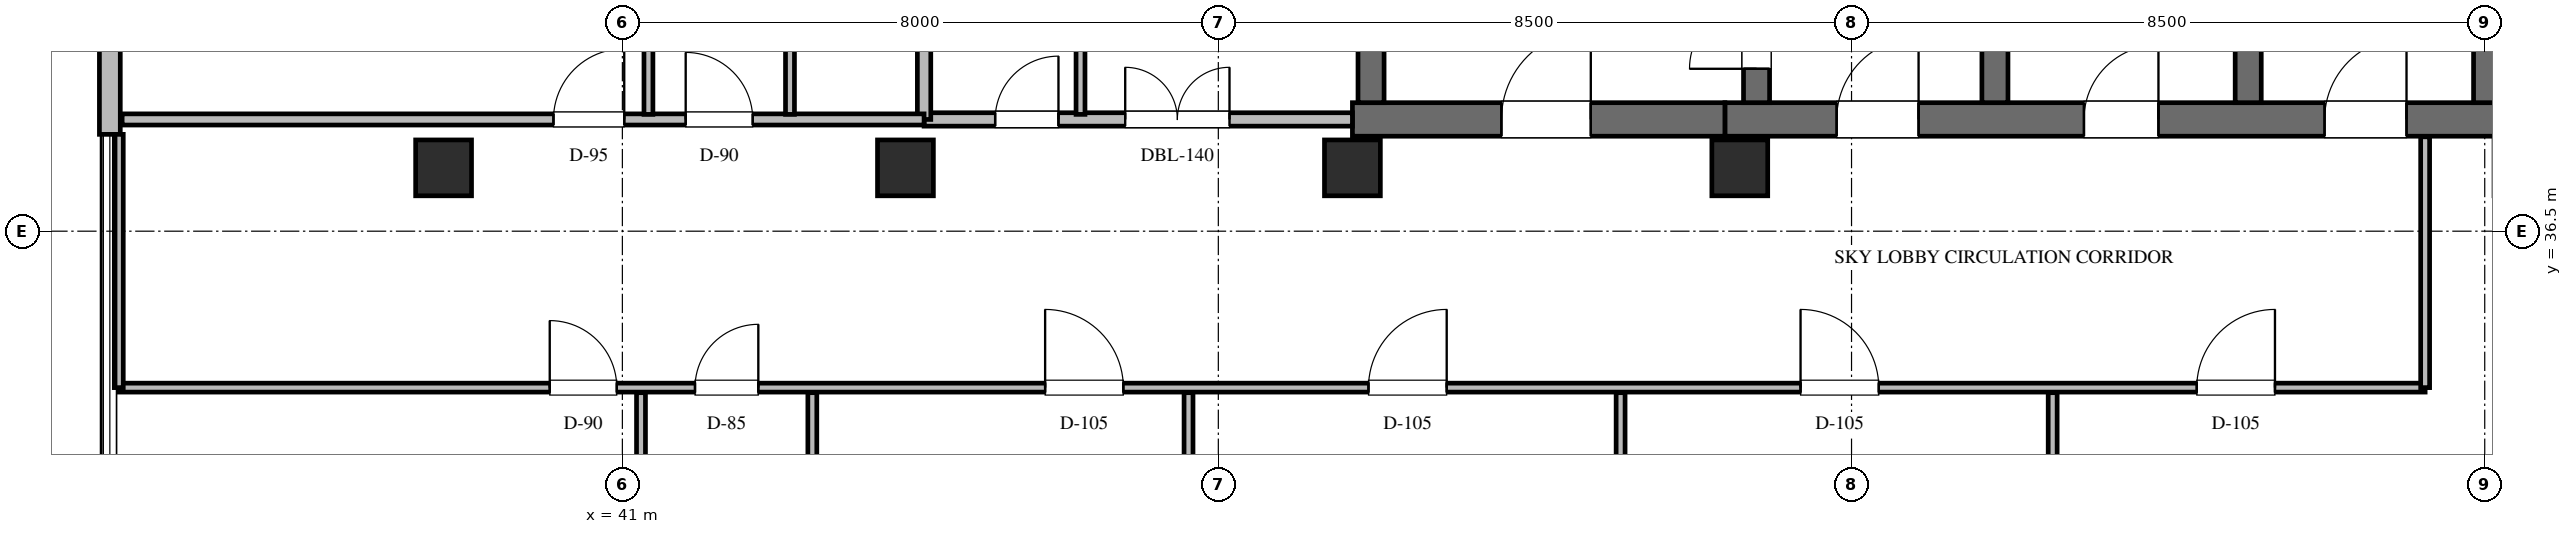
"""IFC4 building model, lengths in metres.
Left out: names, types, materials, properties, quantities, classifications, styles, units other than length and angle.
Written with IfcOpenShell. Run it as: python <this file> out.ifc"""

import sys

from ifc_helpers import new_model, si_unit, direction, frame, frame_2d, origin, origin_2d, place, context, subcontext, project, spatial, rectangle, extrude, element, fill, save


model = new_model("IFC4")
c1 = context("Model", 3, precision=1e-05, world=origin(), true_north=direction((0.0, 1.0)))
c2 = subcontext(c1, "Body", "Model", "MODEL_VIEW")
j1 = project(units=[si_unit("LENGTHUNIT", "METRE"), si_unit("PLANEANGLEUNIT", "RADIAN")], contexts=[c1])
p1 = place(None, origin())
s1 = spatial("IfcSite", under=j1, at=p1, CompositionType="ELEMENT")
p2 = place(p1, origin())
s2 = spatial("IfcBuilding", under=s1, at=p2, CompositionType="ELEMENT")
p3 = place(p2, frame((0.0, 0.0, 311.1)))
s3 = spatial("IfcBuildingStorey", under=s2, at=p3, CompositionType="ELEMENT", Elevation=311.1)
p4 = place(p3, frame((55.8, 38.0, 0.0), z_axis=(0.0, 0.0, 1.0), x_axis=(1.0, 0.0, 0.0)))
e1 = element("IfcWall", 1, at=p4, inside=s3, PredefinedType="SHEAR", context=c2, shape_type="SweptSolid", body=[
    extrude(rectangle(XDim=10.5, YDim=0.45, at=frame_2d((5.25, 0.0))), origin(), (0.0, 0.0, 1.0), 4.5),
])
p5 = place(p4, frame((1.5, 0.0, 0.0)))
e2 = element("IfcOpeningElement", 2, at=p5, cuts=e1, PredefinedType="OPENING", context=c2, shape_type="SweptSolid", body=[
    extrude(rectangle(XDim=1.1, YDim=2.2, at=frame_2d((0.55, 1.1))), frame((0.0, 0.235, 0.0), z_axis=(0.0, -1.0, 0.0), x_axis=(1.0, 0.0, 0.0)), (0.0, 0.0, 1.0), 0.47),
])
p6 = place(p4, frame((4.82, 0.0, 0.0)))
e3 = element("IfcOpeningElement", 3, at=p6, cuts=e1, PredefinedType="OPENING", context=c2, shape_type="SweptSolid", body=[
    extrude(rectangle(XDim=1.0, YDim=2.15, at=frame_2d((0.5, 1.075))), frame((0.0, 0.235, 0.0), z_axis=(0.0, -1.0, 0.0), x_axis=(1.0, 0.0, 0.0)), (0.0, 0.0, 1.0), 0.47),
])
p7 = place(p4, frame((8.05, 0.0, 0.0)))
e4 = element("IfcOpeningElement", 4, at=p7, cuts=e1, PredefinedType="OPENING", context=c2, shape_type="SweptSolid", body=[
    extrude(rectangle(XDim=1.1, YDim=2.2, at=frame_2d((0.55, 1.1))), frame((0.0, 0.235, 0.0), z_axis=(0.0, -1.0, 0.0), x_axis=(1.0, 0.0, 0.0)), (0.0, 0.0, 1.0), 0.47),
])
p8 = place(p3, frame((66.075, 38.225, 0.0), z_axis=(0.0, 0.0, 1.0), x_axis=(0.0, 1.0, 0.0)))
e5 = element("IfcWall", 5, at=p8, inside=s3, PredefinedType="SHEAR", context=c2, shape_type="SweptSolid", body=[
    extrude(rectangle(XDim=8.525, YDim=0.45, at=frame_2d((4.262, 0.0))), origin(), (0.0, 0.0, 1.0), 4.5),
])
for number, where, z_axis, x_axis in (
    (6, (62.825, 38.225, 0.0), (0.0, 0.0, 1.0), (0.0, 1.0, 0.0)),
    (7, (59.425, 38.225, 0.0), (0.0, 0.0, 1.0), (0.0, 1.0, 0.0)),
):
    element("IfcWall", number, at=place(p3, frame(where, z_axis=z_axis, x_axis=x_axis)), inside=s3, PredefinedType="SHEAR", context=c2, shape_type="SweptSolid", body=[
        extrude(rectangle(XDim=8.525, YDim=0.35, at=frame_2d((4.262, 0.0))), origin(), (0.0, 0.0, 1.0), 4.5),
    ])
p9 = place(p3, frame((56.225, 38.225, 0.0), z_axis=(0.0, 0.0, 1.0), x_axis=(0.0, 1.0, 0.0)))
e8 = element("IfcWall", 8, at=p9, inside=s3, PredefinedType="SHEAR", context=c2, shape_type="SweptSolid", body=[
    extrude(rectangle(XDim=8.525, YDim=0.35, at=frame_2d((4.262, 0.0))), origin(), (0.0, 0.0, 1.0), 4.5),
])
p10 = place(p9, frame((0.455, 0.0, 0.0)))
e9 = element("IfcOpeningElement", 9, at=p10, cuts=e8, PredefinedType="OPENING", context=c2, shape_type="SweptSolid", body=[
    extrude(rectangle(XDim=0.9, YDim=2.15, at=frame_2d((0.45, 1.075))), frame((0.0, 0.185, 0.0), z_axis=(0.0, -1.0, 0.0), x_axis=(1.0, 0.0, 0.0)), (0.0, 0.0, 1.0), 0.37),
])
p11 = place(p3, frame((50.8, 38.0, 0.0), z_axis=(0.0, 0.0, 1.0), x_axis=(1.0, 0.0, 0.0)))
e10 = element("IfcWall", 10, at=p11, inside=s3, PredefinedType="SHEAR", context=c2, shape_type="SweptSolid", body=[
    extrude(rectangle(XDim=5.0, YDim=0.45, at=frame_2d((2.5, 0.0))), origin(), (0.0, 0.0, 1.0), 4.5),
])
p12 = place(p11, frame((2.0, 0.0, 0.0)))
e11 = element("IfcOpeningElement", 11, at=p12, cuts=e10, PredefinedType="OPENING", context=c2, shape_type="SweptSolid", body=[
    extrude(rectangle(XDim=1.2, YDim=2.2, at=frame_2d((0.6, 1.1))), frame((0.0, 0.235, 0.0), z_axis=(0.0, -1.0, 0.0), x_axis=(1.0, 0.0, 0.0)), (0.0, 0.0, 1.0), 0.47),
])
p13 = place(p3, frame((51.05, 38.225, 0.0), z_axis=(0.0, 0.0, 1.0), x_axis=(0.0, 1.0, 0.0)))
e12 = element("IfcWall", 12, at=p13, inside=s3, PredefinedType="SHEAR", context=c2, shape_type="SweptSolid", body=[
    extrude(rectangle(XDim=8.525, YDim=0.35, at=frame_2d((4.262, 0.0))), origin(), (0.0, 0.0, 1.0), 4.5),
])
for number, where, z_axis, x_axis in (
    (13, (56.0, 37.35, 0.0), (0.0, 0.0, 1.0), (1.0, 0.0, 0.0)),
    (14, (50.8, 37.35, 0.0), (0.0, 0.0, 1.0), (1.0, 0.0, 0.0)),
    (15, (44.8, 37.35, 0.0), (0.0, 0.0, 1.0), (1.0, 0.0, 0.0)),
    (16, (38.6, 37.35, 0.0), (0.0, 0.0, 1.0), (1.0, 0.0, 0.0)),
):
    element("IfcColumn", number, at=place(p3, frame(where, z_axis=z_axis, x_axis=x_axis)), inside=s3, PredefinedType="COLUMN", context=c2, shape_type="SweptSolid", body=[
        extrude(rectangle(XDim=0.75, YDim=0.75, at=origin_2d()), origin(), (0.0, 0.0, 1.0), 4.5),
    ])
p14 = place(p3, frame((34.12, 37.8, 0.0), z_axis=(0.0, 0.0, 1.0), x_axis=(0.0, 1.0, 0.0)))
e17 = element("IfcWall", 17, at=p14, inside=s3, PredefinedType="STANDARD", context=c2, shape_type="SweptSolid", body=[
    extrude(rectangle(XDim=8.65, YDim=0.28, at=frame_2d((4.325, 0.0))), origin(), (0.0, 0.0, 1.0), 4.22),
])
p15 = place(p3, frame((45.05, 38.0, 0.0), z_axis=(0.0, 0.0, 1.0), x_axis=(1.0, 0.0, 0.0)))
e18 = element("IfcWall", 18, at=p15, inside=s3, PredefinedType="STANDARD", context=c2, shape_type="SweptSolid", body=[
    extrude(rectangle(XDim=5.75, YDim=0.18, at=frame_2d((2.875, 0.0))), origin(), (0.0, 0.0, 1.0), 3.609),
])
p16 = place(p15, frame((0.954, 0.0, 0.0)))
e19 = element("IfcOpeningElement", 19, at=p16, cuts=e18, PredefinedType="OPENING", context=c2, shape_type="SweptSolid", body=[
    extrude(rectangle(XDim=0.85, YDim=2.1, at=frame_2d((0.425, 1.05))), frame((0.0, 0.1, 0.0), z_axis=(0.0, -1.0, 0.0), x_axis=(1.0, 0.0, 0.0)), (0.0, 0.0, 1.0), 0.2),
])
p17 = place(p15, frame((2.7, 0.0, 0.0)))
e20 = element("IfcOpeningElement", 20, at=p17, cuts=e18, PredefinedType="OPENING", context=c2, shape_type="SweptSolid", body=[
    extrude(rectangle(XDim=1.4, YDim=2.2, at=frame_2d((0.7, 1.1))), frame((0.0, 0.1, 0.0), z_axis=(0.0, -1.0, 0.0), x_axis=(1.0, 0.0, 0.0)), (0.0, 0.0, 1.0), 0.2),
])
p18 = place(p3, frame((47.15, 38.068, 0.0), z_axis=(0.0, 0.0, 1.0), x_axis=(0.0, 1.0, 0.0)))
e21 = element("IfcWall", 21, at=p18, inside=s3, PredefinedType="PARTITIONING", context=c2, shape_type="SweptSolid", body=[
    extrude(rectangle(XDim=5.799, YDim=0.12, at=frame_2d((2.899, 0.0))), origin(), (0.0, 0.0, 1.0), 4.22),
])
p19 = place(p18, frame((3.957, 0.0, 0.0)))
e22 = element("IfcOpeningElement", 22, at=p19, cuts=e21, PredefinedType="OPENING", context=c2, shape_type="SweptSolid", body=[
    extrude(rectangle(XDim=0.85, YDim=2.1, at=frame_2d((0.425, 1.05))), frame((0.0, 0.07, 0.0), z_axis=(0.0, -1.0, 0.0), x_axis=(1.0, 0.0, 0.0)), (0.0, 0.0, 1.0), 0.14),
])
p20 = place(p3, frame((45.05, 38.0, 0.0), z_axis=(0.0, 0.0, 1.0), x_axis=(0.0, 1.0, 0.0)))
e23 = element("IfcWall", 23, at=p20, inside=s3, PredefinedType="STANDARD", context=c2, shape_type="SweptSolid", body=[
    extrude(rectangle(XDim=5.875, YDim=0.18, at=frame_2d((2.938, 0.0))), origin(), (0.0, 0.0, 1.0), 3.609),
])
p21 = place(p3, frame((34.285, 38.0, 0.0), z_axis=(0.0, 0.0, 1.0), x_axis=(1.0, 0.0, 0.0)))
e24 = element("IfcWall", 24, at=p21, inside=s3, PredefinedType="PARTITIONING", context=c2, shape_type="SweptSolid", body=[
    extrude(rectangle(XDim=10.765, YDim=0.15, at=frame_2d((5.383, 0.0))), origin(), (0.0, 0.0, 1.0), 3.609),
])
p22 = place(p21, frame((5.79, 0.0, 0.0)))
e25 = element("IfcOpeningElement", 25, at=p22, cuts=e24, PredefinedType="OPENING", context=c2, shape_type="SweptSolid", body=[
    extrude(rectangle(XDim=0.95, YDim=2.15, at=frame_2d((0.475, 1.075))), frame((0.0, 0.085, 0.0), z_axis=(0.0, -1.0, 0.0), x_axis=(1.0, 0.0, 0.0)), (0.0, 0.0, 1.0), 0.17),
])
p23 = place(p21, frame((7.565, 0.0, 0.0)))
e26 = element("IfcOpeningElement", 26, at=p23, cuts=e24, PredefinedType="OPENING", context=c2, shape_type="SweptSolid", body=[
    extrude(rectangle(XDim=0.9, YDim=2.1, at=frame_2d((0.45, 1.05))), frame((0.0, 0.085, 0.0), z_axis=(0.0, -1.0, 0.0), x_axis=(1.0, 0.0, 0.0)), (0.0, 0.0, 1.0), 0.17),
])
p24 = place(p3, frame((41.35, 38.068, 0.0), z_axis=(0.0, 0.0, 1.0), x_axis=(0.0, 1.0, 0.0)))
e27 = element("IfcWall", 27, at=p24, inside=s3, PredefinedType="PARTITIONING", context=c2, shape_type="SweptSolid", body=[
    extrude(rectangle(XDim=8.682, YDim=0.12, at=frame_2d((4.341, 0.0))), origin(), (0.0, 0.0, 1.0), 4.22),
])
p25 = place(p3, frame((43.25, 38.068, 0.0), z_axis=(0.0, 0.0, 1.0), x_axis=(0.0, 1.0, 0.0)))
e28 = element("IfcWall", 28, at=p25, inside=s3, PredefinedType="PARTITIONING", context=c2, shape_type="SweptSolid", body=[
    extrude(rectangle(XDim=8.682, YDim=0.12, at=frame_2d((4.341, 0.0))), origin(), (0.0, 0.0, 1.0), 4.22),
])
p26 = place(p25, frame((2.366, 0.0, 0.0)))
e29 = element("IfcOpeningElement", 29, at=p26, cuts=e28, PredefinedType="OPENING", context=c2, shape_type="SweptSolid", body=[
    extrude(rectangle(XDim=0.85, YDim=2.1, at=frame_2d((0.425, 1.05))), frame((0.0, 0.07, 0.0), z_axis=(0.0, -1.0, 0.0), x_axis=(1.0, 0.0, 0.0)), (0.0, 0.0, 1.0), 0.14),
])
p27 = place(p3, frame((34.24, 34.4, 0.0), z_axis=(0.0, 0.0, 1.0), x_axis=(1.0, 0.0, 0.0)))
e30 = element("IfcWall", 30, at=p27, inside=s3, PredefinedType="PARTITIONING", context=c2, shape_type="SweptSolid", body=[
    extrude(rectangle(XDim=30.96, YDim=0.12, at=frame_2d((15.48, 0.0))), origin(), (0.0, 0.0, 1.0), 3.609),
])
p28 = place(p27, frame((5.785, 0.0, 0.0)))
e31 = element("IfcOpeningElement", 31, at=p28, cuts=e30, PredefinedType="OPENING", context=c2, shape_type="SweptSolid", body=[
    extrude(rectangle(XDim=0.9, YDim=2.1, at=frame_2d((0.45, 1.05))), frame((0.0, 0.07, 0.0), z_axis=(0.0, -1.0, 0.0), x_axis=(1.0, 0.0, 0.0)), (0.0, 0.0, 1.0), 0.14),
])
p29 = place(p27, frame((7.735, 0.0, 0.0)))
e32 = element("IfcOpeningElement", 32, at=p29, cuts=e30, PredefinedType="OPENING", context=c2, shape_type="SweptSolid", body=[
    extrude(rectangle(XDim=0.85, YDim=2.1, at=frame_2d((0.425, 1.05))), frame((0.0, 0.07, 0.0), z_axis=(0.0, -1.0, 0.0), x_axis=(1.0, 0.0, 0.0)), (0.0, 0.0, 1.0), 0.14),
])
p30 = place(p27, frame((12.435, 0.0, 0.0)))
e33 = element("IfcOpeningElement", 33, at=p30, cuts=e30, PredefinedType="OPENING", context=c2, shape_type="SweptSolid", body=[
    extrude(rectangle(XDim=1.05, YDim=2.2, at=frame_2d((0.525, 1.1))), frame((0.0, 0.07, 0.0), z_axis=(0.0, -1.0, 0.0), x_axis=(1.0, 0.0, 0.0)), (0.0, 0.0, 1.0), 0.14),
])
p31 = place(p27, frame((16.776, 0.0, 0.0)))
e34 = element("IfcOpeningElement", 34, at=p31, cuts=e30, PredefinedType="OPENING", context=c2, shape_type="SweptSolid", body=[
    extrude(rectangle(XDim=1.05, YDim=2.2, at=frame_2d((0.525, 1.1))), frame((0.0, 0.07, 0.0), z_axis=(0.0, -1.0, 0.0), x_axis=(1.0, 0.0, 0.0)), (0.0, 0.0, 1.0), 0.14),
])
p32 = place(p27, frame((22.576, 0.0, 0.0)))
e35 = element("IfcOpeningElement", 35, at=p32, cuts=e30, PredefinedType="OPENING", context=c2, shape_type="SweptSolid", body=[
    extrude(rectangle(XDim=1.05, YDim=2.2, at=frame_2d((0.525, 1.1))), frame((0.0, 0.07, 0.0), z_axis=(0.0, -1.0, 0.0), x_axis=(1.0, 0.0, 0.0)), (0.0, 0.0, 1.0), 0.14),
])
p33 = place(p27, frame((27.894, 0.0, 0.0)))
e36 = element("IfcOpeningElement", 36, at=p33, cuts=e30, PredefinedType="OPENING", context=c2, shape_type="SweptSolid", body=[
    extrude(rectangle(XDim=1.05, YDim=2.2, at=frame_2d((0.525, 1.1))), frame((0.0, 0.07, 0.0), z_axis=(0.0, -1.0, 0.0), x_axis=(1.0, 0.0, 0.0)), (0.0, 0.0, 1.0), 0.14),
])
p34 = place(p3, frame((34.24, 34.4, 0.0), z_axis=(0.0, 0.0, 1.0), x_axis=(0.0, 1.0, 0.0)))
e37 = element("IfcWall", 37, at=p34, inside=s3, PredefinedType="PARTITIONING", context=c2, shape_type="SweptSolid", body=[
    extrude(rectangle(XDim=3.4, YDim=0.12, at=frame_2d((1.7, 0.0))), origin(), (0.0, 0.0, 1.0), 4.22),
])
p35 = place(p3, frame((65.2, 34.4, 0.0), z_axis=(0.0, 0.0, 1.0), x_axis=(0.0, 1.0, 0.0)))
e38 = element("IfcWall", 38, at=p35, inside=s3, PredefinedType="PARTITIONING", context=c2, shape_type="SweptSolid", body=[
    extrude(rectangle(XDim=3.367, YDim=0.12, at=frame_2d((1.684, 0.0))), origin(), (0.0, 0.0, 1.0), 3.609),
])
p36 = place(p3, frame((41.25, 31.468, 0.0), z_axis=(0.0, 0.0, 1.0), x_axis=(0.0, 1.0, 0.0)))
e39 = element("IfcWall", 39, at=p36, inside=s3, PredefinedType="PARTITIONING", context=c2, shape_type="SweptSolid", body=[
    extrude(rectangle(XDim=2.864, YDim=0.12, at=frame_2d((1.432, 0.0))), origin(), (0.0, 0.0, 1.0), 3.609),
])
p37 = place(p3, frame((43.55, 31.4, 0.0), z_axis=(0.0, 0.0, 1.0), x_axis=(0.0, 1.0, 0.0)))
e40 = element("IfcWall", 40, at=p37, inside=s3, PredefinedType="PARTITIONING", context=c2, shape_type="SweptSolid", body=[
    extrude(rectangle(XDim=2.932, YDim=0.12, at=frame_2d((1.466, 0.0))), origin(), (0.0, 0.0, 1.0), 3.609),
])
p38 = place(p3, frame((48.6, 27.125, 0.0), z_axis=(0.0, 0.0, 1.0), x_axis=(0.0, 1.0, 0.0)))
e41 = element("IfcWall", 41, at=p38, inside=s3, PredefinedType="PARTITIONING", context=c2, shape_type="SweptSolid", body=[
    extrude(rectangle(XDim=7.207, YDim=0.12, at=frame_2d((3.604, 0.0))), origin(), (0.0, 0.0, 1.0), 3.609),
])
for number, where, z_axis, x_axis in (
    (42, (54.4, 19.615, 0.0), (0.0, 0.0, 1.0), (0.0, 1.0, 0.0)),
    (43, (60.2, 19.615, 0.0), (0.0, 0.0, 1.0), (0.0, 1.0, 0.0)),
):
    element("IfcWall", number, at=place(p3, frame(where, z_axis=z_axis, x_axis=x_axis)), inside=s3, PredefinedType="PARTITIONING", context=c2, shape_type="SweptSolid", body=[
        extrude(rectangle(XDim=14.717, YDim=0.12, at=frame_2d((7.358, 0.0))), origin(), (0.0, 0.0, 1.0), 3.609),
    ])
p39 = place(p5, origin())
e44 = element("IfcDoor", 44, at=p39, inside=s3, OperationType="SINGLE_SWING_RIGHT", PredefinedType="DOOR", context=c2, shape_type="SweptSolid", body=[
    extrude(rectangle(XDim=1.1, YDim=2.2, at=frame_2d((0.55, 1.1))), frame((0.0, 0.025, 0.0), z_axis=(0.0, -1.0, 0.0), x_axis=(1.0, 0.0, 0.0)), (0.0, 0.0, 1.0), 0.05),
])
fill(e2, e44)
p40 = place(p6, origin())
e45 = element("IfcDoor", 45, at=p40, inside=s3, OperationType="SINGLE_SWING_RIGHT", PredefinedType="DOOR", context=c2, shape_type="SweptSolid", body=[
    extrude(rectangle(XDim=1.0, YDim=2.15, at=frame_2d((0.5, 1.075))), frame((0.0, 0.025, 0.0), z_axis=(0.0, -1.0, 0.0), x_axis=(1.0, 0.0, 0.0)), (0.0, 0.0, 1.0), 0.05),
])
fill(e3, e45)
p41 = place(p7, origin())
e46 = element("IfcDoor", 46, at=p41, inside=s3, OperationType="SINGLE_SWING_RIGHT", PredefinedType="DOOR", context=c2, shape_type="SweptSolid", body=[
    extrude(rectangle(XDim=1.1, YDim=2.2, at=frame_2d((0.55, 1.1))), frame((0.0, 0.025, 0.0), z_axis=(0.0, -1.0, 0.0), x_axis=(1.0, 0.0, 0.0)), (0.0, 0.0, 1.0), 0.05),
])
fill(e4, e46)
p42 = place(p12, origin())
e47 = element("IfcDoor", 47, at=p42, inside=s3, OperationType="SINGLE_SWING_RIGHT", PredefinedType="DOOR", context=c2, shape_type="SweptSolid", body=[
    extrude(rectangle(XDim=1.2, YDim=2.2, at=frame_2d((0.6, 1.1))), frame((0.0, 0.025, 0.0), z_axis=(0.0, -1.0, 0.0), x_axis=(1.0, 0.0, 0.0)), (0.0, 0.0, 1.0), 0.05),
])
fill(e11, e47)
p43 = place(p10, origin())
e48 = element("IfcDoor", 48, at=p43, inside=s3, OperationType="SINGLE_SWING_LEFT", PredefinedType="DOOR", context=c2, shape_type="SweptSolid", body=[
    extrude(rectangle(XDim=0.9, YDim=2.15, at=frame_2d((0.45, 1.075))), frame((0.0, 0.025, 0.0), z_axis=(0.0, -1.0, 0.0), x_axis=(1.0, 0.0, 0.0)), (0.0, 0.0, 1.0), 0.05),
])
fill(e9, e48)
p44 = place(p16, origin())
e49 = element("IfcDoor", 49, at=p44, inside=s3, OperationType="SINGLE_SWING_RIGHT", PredefinedType="DOOR", context=c2, shape_type="SweptSolid", body=[
    extrude(rectangle(XDim=0.85, YDim=2.1, at=frame_2d((0.425, 1.05))), frame((0.0, 0.025, 0.0), z_axis=(0.0, -1.0, 0.0), x_axis=(1.0, 0.0, 0.0)), (0.0, 0.0, 1.0), 0.05),
])
fill(e19, e49)
p45 = place(p17, origin())
e50 = element("IfcDoor", 50, at=p45, inside=s3, OperationType="DOUBLE_DOOR_SINGLE_SWING", PredefinedType="DOOR", context=c2, shape_type="SweptSolid", body=[
    extrude(rectangle(XDim=1.4, YDim=2.2, at=frame_2d((0.7, 1.1))), frame((0.0, 0.025, 0.0), z_axis=(0.0, -1.0, 0.0), x_axis=(1.0, 0.0, 0.0)), (0.0, 0.0, 1.0), 0.05),
])
fill(e20, e50)
p46 = place(p22, origin())
e51 = element("IfcDoor", 51, at=p46, inside=s3, OperationType="SINGLE_SWING_RIGHT", PredefinedType="DOOR", context=c2, shape_type="SweptSolid", body=[
    extrude(rectangle(XDim=0.95, YDim=2.15, at=frame_2d((0.475, 1.075))), frame((0.0, 0.025, 0.0), z_axis=(0.0, -1.0, 0.0), x_axis=(1.0, 0.0, 0.0)), (0.0, 0.0, 1.0), 0.05),
])
fill(e25, e51)
p47 = place(p23, origin())
e52 = element("IfcDoor", 52, at=p47, inside=s3, OperationType="SINGLE_SWING_LEFT", PredefinedType="DOOR", context=c2, shape_type="SweptSolid", body=[
    extrude(rectangle(XDim=0.9, YDim=2.1, at=frame_2d((0.45, 1.05))), frame((0.0, 0.025, 0.0), z_axis=(0.0, -1.0, 0.0), x_axis=(1.0, 0.0, 0.0)), (0.0, 0.0, 1.0), 0.05),
])
fill(e26, e52)
p48 = place(p28, origin())
e53 = element("IfcDoor", 53, at=p48, inside=s3, OperationType="SINGLE_SWING_LEFT", PredefinedType="DOOR", context=c2, shape_type="SweptSolid", body=[
    extrude(rectangle(XDim=0.9, YDim=2.1, at=frame_2d((0.45, 1.05))), frame((0.0, 0.025, 0.0), z_axis=(0.0, -1.0, 0.0), x_axis=(1.0, 0.0, 0.0)), (0.0, 0.0, 1.0), 0.05),
])
fill(e31, e53)
p49 = place(p29, origin())
e54 = element("IfcDoor", 54, at=p49, inside=s3, OperationType="SINGLE_SWING_RIGHT", PredefinedType="DOOR", context=c2, shape_type="SweptSolid", body=[
    extrude(rectangle(XDim=0.85, YDim=2.1, at=frame_2d((0.425, 1.05))), frame((0.0, 0.025, 0.0), z_axis=(0.0, -1.0, 0.0), x_axis=(1.0, 0.0, 0.0)), (0.0, 0.0, 1.0), 0.05),
])
fill(e32, e54)
p50 = place(p30, origin())
e55 = element("IfcDoor", 55, at=p50, inside=s3, OperationType="SINGLE_SWING_LEFT", PredefinedType="DOOR", context=c2, shape_type="SweptSolid", body=[
    extrude(rectangle(XDim=1.05, YDim=2.2, at=frame_2d((0.525, 1.1))), frame((0.0, 0.025, 0.0), z_axis=(0.0, -1.0, 0.0), x_axis=(1.0, 0.0, 0.0)), (0.0, 0.0, 1.0), 0.05),
])
fill(e33, e55)
p51 = place(p31, origin())
e56 = element("IfcDoor", 56, at=p51, inside=s3, OperationType="SINGLE_SWING_RIGHT", PredefinedType="DOOR", context=c2, shape_type="SweptSolid", body=[
    extrude(rectangle(XDim=1.05, YDim=2.2, at=frame_2d((0.525, 1.1))), frame((0.0, 0.025, 0.0), z_axis=(0.0, -1.0, 0.0), x_axis=(1.0, 0.0, 0.0)), (0.0, 0.0, 1.0), 0.05),
])
fill(e34, e56)
p52 = place(p32, origin())
e57 = element("IfcDoor", 57, at=p52, inside=s3, OperationType="SINGLE_SWING_LEFT", PredefinedType="DOOR", context=c2, shape_type="SweptSolid", body=[
    extrude(rectangle(XDim=1.05, YDim=2.2, at=frame_2d((0.525, 1.1))), frame((0.0, 0.025, 0.0), z_axis=(0.0, -1.0, 0.0), x_axis=(1.0, 0.0, 0.0)), (0.0, 0.0, 1.0), 0.05),
])
fill(e35, e57)
p53 = place(p33, origin())
e58 = element("IfcDoor", 58, at=p53, inside=s3, OperationType="SINGLE_SWING_RIGHT", PredefinedType="DOOR", context=c2, shape_type="SweptSolid", body=[
    extrude(rectangle(XDim=1.05, YDim=2.2, at=frame_2d((0.525, 1.1))), frame((0.0, 0.025, 0.0), z_axis=(0.0, -1.0, 0.0), x_axis=(1.0, 0.0, 0.0)), (0.0, 0.0, 1.0), 0.05),
])
fill(e36, e58)
save(model, sys.argv[1])
